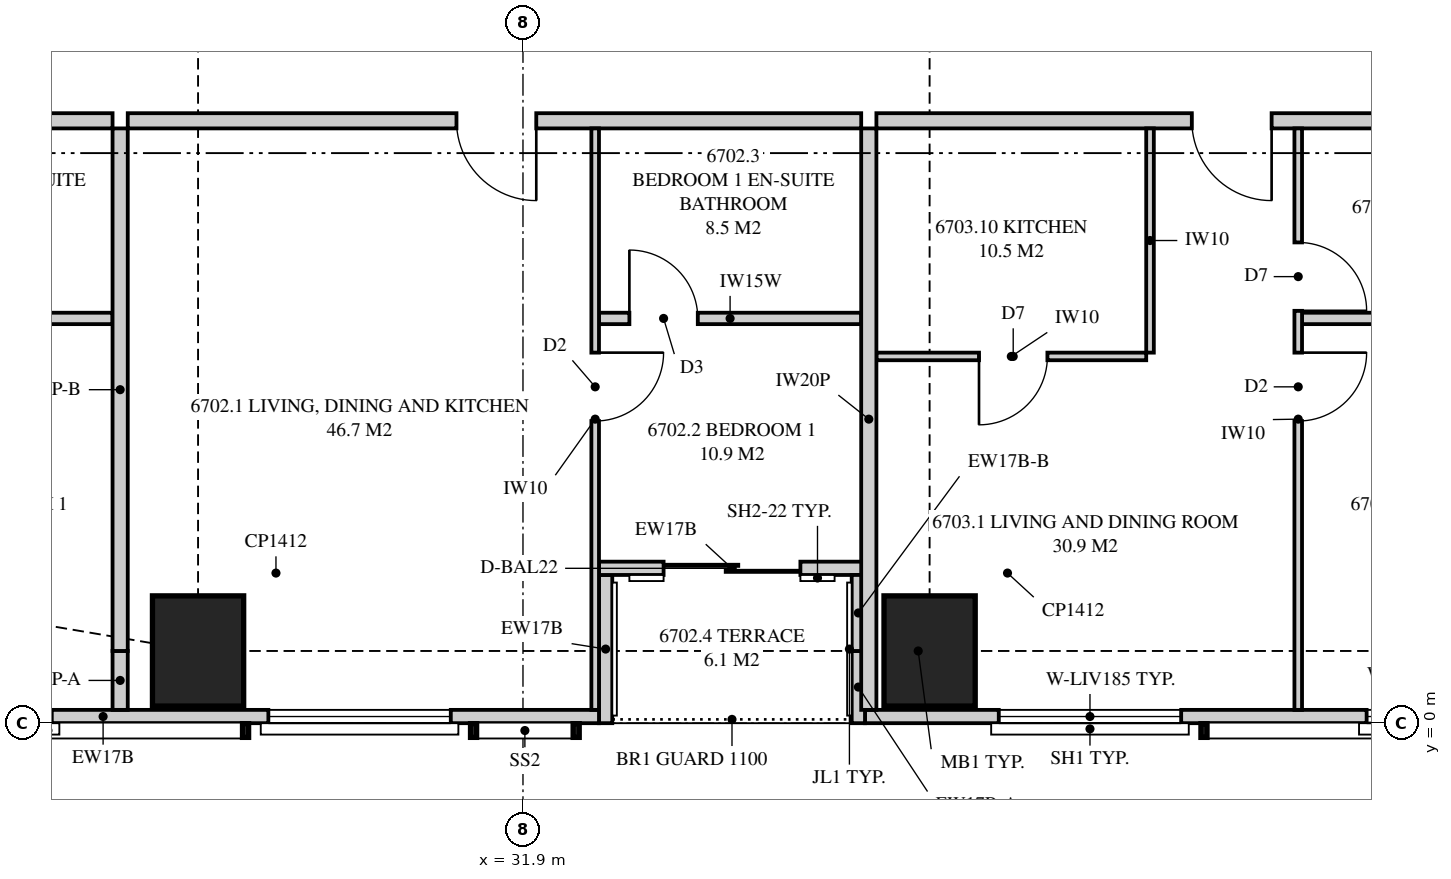
"""IFC4 building model, lengths in metres.
Left out: names, types, materials, properties, quantities, classifications, styles, units other than length and angle.
Written with IfcOpenShell. Run it as: python <this file> out.ifc"""

import sys

from ifc_helpers import new_model, si_unit, direction, frame, frame_2d, origin, origin_2d, place, context, subcontext, project, spatial, polyline, rectangle, outline, extrude, element, fill, save


model = new_model("IFC4")
c1 = context("Model", 3, precision=1e-05, world=origin(), true_north=direction((0.0, 1.0)))
c2 = subcontext(c1, "Body", "Model", "MODEL_VIEW")
j1 = project(units=[si_unit("LENGTHUNIT", "METRE"), si_unit("PLANEANGLEUNIT", "RADIAN")], contexts=[c1])
p1 = place(None, origin())
s1 = spatial("IfcSite", under=j1, at=p1, CompositionType="ELEMENT")
p2 = place(p1, origin())
s2 = spatial("IfcBuilding", under=s1, at=p2, CompositionType="ELEMENT")
p3 = place(p2, frame((0.0, 0.0, 245.95)))
s3 = spatial("IfcBuildingStorey", under=s2, at=p3, CompositionType="ELEMENT", Elevation=245.95)
for number, where, z_axis, x_axis in (
    (1, (27.625, 0.95, 0.0), (0.0, 0.0, 1.0), (0.0, 1.0, 0.0)),
    (2, (37.25, 0.95, 0.0), (0.0, 0.0, 1.0), (0.0, 1.0, 0.0)),
):
    element("IfcColumn", number, at=place(p3, frame(where, z_axis=z_axis, x_axis=x_axis)), inside=s3, PredefinedType="COLUMN", context=c2, shape_type="SweptSolid", body=[
        extrude(rectangle(XDim=1.45, YDim=1.2, at=origin_2d()), origin(), (0.0, 0.0, 1.0), 3.5),
    ])
p4 = place(p3, frame((19.851, 0.087, 0.0), z_axis=(0.0, 0.0, 1.0), x_axis=(1.0, 0.0, 0.0)))
e3 = element("IfcWall", 3, at=p4, inside=s3, PredefinedType="SOLIDWALL", context=c2, shape_type="SweptSolid", body=[
    extrude(outline(polyline([(0.0, 0.0), (13.049, 0.0), (13.049, 2.3), (7.774, 2.3), (7.774, 3.26), (7.642, 3.26), (7.642, 2.3), (7.559, 2.3), (7.559, 3.26), (0.0, 3.26), (0.0, 0.0)])), frame((0.0, 0.087, 0.0), z_axis=(0.0, -1.0, 0.0), x_axis=(1.0, 0.0, 0.0)), (0.0, 0.0, 1.0), 0.175),
])
p5 = place(p4, frame((0.636, 0.0, 0.4)))
e4 = element("IfcOpeningElement", 4, at=p5, cuts=e3, PredefinedType="OPENING", context=c2, shape_type="SweptSolid", body=[
    extrude(rectangle(XDim=1.8, YDim=1.85, at=frame_2d((0.9, 0.925))), frame((0.0, 0.097, 0.0), z_axis=(0.0, -1.0, 0.0), x_axis=(1.0, 0.0, 0.0)), (0.0, 0.0, 1.0), 0.195),
])
p6 = place(p4, frame((4.049, 0.0, 0.4)))
e5 = element("IfcOpeningElement", 5, at=p6, cuts=e3, PredefinedType="OPENING", context=c2, shape_type="SweptSolid", body=[
    extrude(rectangle(XDim=1.8, YDim=1.85, at=frame_2d((0.9, 0.925))), frame((0.0, 0.097, 0.0), z_axis=(0.0, -1.0, 0.0), x_axis=(1.0, 0.0, 0.0)), (0.0, 0.0, 1.0), 0.195),
])
p7 = place(p4, frame((8.699, 0.0, 0.4)))
e6 = element("IfcOpeningElement", 6, at=p7, cuts=e3, PredefinedType="OPENING", context=c2, shape_type="SweptSolid", body=[
    extrude(rectangle(XDim=2.4, YDim=1.85, at=frame_2d((1.2, 0.925))), frame((0.0, 0.097, 0.0), z_axis=(0.0, -1.0, 0.0), x_axis=(1.0, 0.0, 0.0)), (0.0, 0.0, 1.0), 0.195),
])
p8 = place(p3, frame((36.4, 0.087, 0.0), z_axis=(0.0, 0.0, 1.0), x_axis=(1.0, 0.0, 0.0)))
e7 = element("IfcWall", 7, at=p8, inside=s3, PredefinedType="SOLIDWALL", context=c2, shape_type="SweptSolid", body=[
    extrude(outline(polyline([(0.0, 0.0), (17.049, 0.0), (17.049, 3.26), (10.69, 3.26), (10.69, 2.3), (10.606, 2.3), (10.606, 3.26), (10.475, 3.26), (10.475, 2.3), (0.0, 2.3), (0.0, 0.0)])), frame((0.0, 0.087, 0.0), z_axis=(0.0, -1.0, 0.0), x_axis=(1.0, 0.0, 0.0)), (0.0, 0.0, 1.0), 0.175),
])
p9 = place(p8, frame((1.76, 0.0, 0.4)))
e8 = element("IfcOpeningElement", 8, at=p9, cuts=e7, PredefinedType="OPENING", context=c2, shape_type="SweptSolid", body=[
    extrude(rectangle(XDim=2.4, YDim=1.85, at=frame_2d((1.2, 0.925))), frame((0.0, 0.097, 0.0), z_axis=(0.0, -1.0, 0.0), x_axis=(1.0, 0.0, 0.0)), (0.0, 0.0, 1.0), 0.195),
])
p10 = place(p8, frame((6.6, 0.0, 0.4)))
e9 = element("IfcOpeningElement", 9, at=p10, cuts=e7, PredefinedType="OPENING", context=c2, shape_type="SweptSolid", body=[
    extrude(rectangle(XDim=1.8, YDim=1.85, at=frame_2d((0.9, 0.925))), frame((0.0, 0.097, 0.0), z_axis=(0.0, -1.0, 0.0), x_axis=(1.0, 0.0, 0.0)), (0.0, 0.0, 1.0), 0.195),
])
p11 = place(p8, frame((11.357, 0.0, 0.4)))
e10 = element("IfcOpeningElement", 10, at=p11, cuts=e7, PredefinedType="OPENING", context=c2, shape_type="SweptSolid", body=[
    extrude(rectangle(XDim=1.8, YDim=1.85, at=frame_2d((0.9, 0.925))), frame((0.0, 0.097, 0.0), z_axis=(0.0, -1.0, 0.0), x_axis=(1.0, 0.0, 0.0)), (0.0, 0.0, 1.0), 0.195),
])
p12 = place(p8, frame((14.2, 0.0, 0.4)))
e11 = element("IfcOpeningElement", 11, at=p12, cuts=e7, PredefinedType="OPENING", context=c2, shape_type="SweptSolid", body=[
    extrude(rectangle(XDim=1.8, YDim=1.85, at=frame_2d((0.9, 0.925))), frame((0.0, 0.097, 0.0), z_axis=(0.0, -1.0, 0.0), x_axis=(1.0, 0.0, 0.0)), (0.0, 0.0, 1.0), 0.195),
])
p13 = place(p3, frame((32.9, 2.038, 0.0), z_axis=(0.0, 0.0, 1.0), x_axis=(1.0, 0.0, 0.0)))
e12 = element("IfcWall", 12, at=p13, inside=s3, PredefinedType="SOLIDWALL", context=c2, shape_type="SweptSolid", body=[
    extrude(outline(polyline([(0.0, 0.0), (3.5, 0.0), (3.5, 2.66), (3.15, 2.66), (3.15, 3.26), (0.0, 3.26), (0.0, 0.0)])), frame((0.0, 0.087, 0.0), z_axis=(0.0, -1.0, 0.0), x_axis=(1.0, 0.0, 0.0)), (0.0, 0.0, 1.0), 0.175),
])
p14 = place(p13, frame((0.85, 0.0, 0.0)))
e13 = element("IfcOpeningElement", 13, at=p14, cuts=e12, PredefinedType="OPENING", context=c2, shape_type="SweptSolid", body=[
    extrude(rectangle(XDim=1.8, YDim=2.25, at=frame_2d((0.9, 1.125))), frame((0.0, 0.097, 0.0), z_axis=(0.0, -1.0, 0.0), x_axis=(1.0, 0.0, 0.0)), (0.0, 0.0, 1.0), 0.195),
])
p15 = place(p3, frame((32.988, 0.0, 0.0), z_axis=(0.0, 0.0, 1.0), x_axis=(0.0, 1.0, 0.0)))
e14 = element("IfcWall", 14, at=p15, inside=s3, PredefinedType="SOLIDWALL", context=c2, shape_type="SweptSolid", body=[
    extrude(outline(polyline([(0.0, 0.0), (1.95, 0.0), (1.95, 3.26), (1.75, 3.26), (1.75, 2.3), (0.15, 2.3), (0.15, 3.26), (0.0, 3.26), (0.0, 0.0)])), frame((0.0, 0.087, 0.0), z_axis=(0.0, -1.0, 0.0), x_axis=(1.0, 0.0, 0.0)), (0.0, 0.0, 1.0), 0.175),
])
p16 = place(p3, frame((36.312, 0.0, 0.0), z_axis=(0.0, 0.0, 1.0), x_axis=(0.0, 1.0, 0.0)))
e15 = element("IfcWall", 15, at=p16, inside=s3, PredefinedType="SOLIDWALL", context=c2, shape_type="SweptSolid", body=[
    extrude(outline(polyline([(0.0, 0.0), (0.95, 0.0), (0.95, 2.3), (0.15, 2.3), (0.15, 3.26), (0.0, 3.26), (0.0, 0.0)])), frame((0.0, 0.087, 0.0), z_axis=(0.0, -1.0, 0.0), x_axis=(1.0, 0.0, 0.0)), (0.0, 0.0, 1.0), 0.175),
])
p17 = place(p3, frame((36.312, 0.95, 0.0), z_axis=(0.0, 0.0, 1.0), x_axis=(0.0, 1.0, 0.0)))
e16 = element("IfcWall", 16, at=p17, inside=s3, PredefinedType="SOLIDWALL", context=c2, shape_type="SweptSolid", body=[
    extrude(outline(polyline([(0.0, 0.0), (1.0, 0.0), (1.0, 2.66), (0.8, 2.66), (0.8, 2.3), (0.0, 2.3), (0.0, 0.0)])), frame((0.0, 0.087, 0.0), z_axis=(0.0, -1.0, 0.0), x_axis=(1.0, 0.0, 0.0)), (0.0, 0.0, 1.0), 0.175),
])
p18 = place(p3, frame((26.6, 0.175, 0.0), z_axis=(0.0, 0.0, 1.0), x_axis=(0.0, 1.0, 0.0)))
e17 = element("IfcWall", 17, at=p18, inside=s3, PredefinedType="PARTITIONING", context=c2, shape_type="SweptSolid", body=[
    extrude(outline(polyline([(0.0, 0.0), (0.775, 0.0), (0.775, 2.3), (0.026, 2.3), (0.026, 3.26), (0.0, 3.26), (0.0, 0.0)])), frame((0.0, 0.1, 0.0), z_axis=(0.0, -1.0, 0.0), x_axis=(1.0, 0.0, 0.0)), (0.0, 0.0, 1.0), 0.2),
])
p19 = place(p3, frame((26.6, 0.95, 0.0), z_axis=(0.0, 0.0, 1.0), x_axis=(0.0, 1.0, 0.0)))
e18 = element("IfcWall", 18, at=p19, inside=s3, PredefinedType="PARTITIONING", context=c2, shape_type="SweptSolid", body=[
    extrude(outline(polyline([(0.0, 0.0), (6.875, 0.0), (6.875, 2.66), (1.097, 2.66), (1.097, 2.3), (0.0, 2.3), (0.0, 0.0)])), frame((0.0, 0.1, 0.0), z_axis=(0.0, -1.0, 0.0), x_axis=(1.0, 0.0, 0.0)), (0.0, 0.0, 1.0), 0.2),
])
p20 = place(p3, frame((18.0, 7.925, 0.0), z_axis=(0.0, 0.0, 1.0), x_axis=(1.0, 0.0, 0.0)))
e19 = element("IfcWall", 19, at=p20, inside=s3, PredefinedType="PARTITIONING", context=c2, shape_type="SweptSolid", body=[
    extrude(outline(polyline([(0.0, 0.0), (8.5, 0.0), (8.5, 3.26), (8.5, 2.66), (8.315, 2.66), (8.315, 3.26), (1.839, 3.26), (1.839, 2.3), (0.0, 2.3), (0.0, 3.26), (0.0, 0.0)])), frame((0.0, 0.1, 0.0), z_axis=(0.0, -1.0, 0.0), x_axis=(1.0, 0.0, 0.0)), (0.0, 0.0, 1.0), 0.2),
])
p21 = place(p20, frame((3.6, 0.0, 0.0)))
e20 = element("IfcOpeningElement", 20, at=p21, cuts=e19, PredefinedType="OPENING", context=c2, shape_type="SweptSolid", body=[
    extrude(rectangle(XDim=1.05, YDim=2.2, at=frame_2d((0.525, 1.1))), frame((0.0, 0.11, 0.0), z_axis=(0.0, -1.0, 0.0), x_axis=(1.0, 0.0, 0.0)), (0.0, 0.0, 1.0), 0.22),
])
p22 = place(p3, frame((23.05, 5.325, 0.0), z_axis=(0.0, 0.0, 1.0), x_axis=(1.0, 0.0, 0.0)))
e21 = element("IfcWall", 21, at=p22, inside=s3, PredefinedType="PLUMBINGWALL", context=c2, shape_type="SweptSolid", body=[
    extrude(outline(polyline([(0.0, 0.0), (3.45, 0.0), (3.45, 3.26), (3.45, 2.66), (3.29, 2.66), (3.29, 3.26), (0.0, 3.26), (0.0, 0.0)])), frame((0.0, 0.075, 0.0), z_axis=(0.0, -1.0, 0.0), x_axis=(1.0, 0.0, 0.0)), (0.0, 0.0, 1.0), 0.15),
])
p23 = place(p22, frame((0.4, 0.0, 0.0)))
e22 = element("IfcOpeningElement", 22, at=p23, cuts=e21, PredefinedType="OPENING", context=c2, shape_type="SweptSolid", body=[
    extrude(rectangle(XDim=0.9, YDim=2.1, at=frame_2d((0.45, 1.05))), frame((0.0, 0.085, 0.0), z_axis=(0.0, -1.0, 0.0), x_axis=(1.0, 0.0, 0.0)), (0.0, 0.0, 1.0), 0.17),
])
p24 = place(p3, frame((36.45, 0.175, 0.0), z_axis=(0.0, 0.0, 1.0), x_axis=(0.0, 1.0, 0.0)))
e23 = element("IfcWall", 23, at=p24, inside=s3, PredefinedType="PARTITIONING", context=c2, shape_type="SweptSolid", body=[
    extrude(outline(polyline([(0.0, 0.0), (7.65, 0.0), (7.65, 3.26), (7.65, 2.66), (1.685, 2.66), (1.685, 2.3), (0.0, 2.3), (0.0, 3.26), (0.0, 0.0)])), frame((0.0, 0.1, 0.0), z_axis=(0.0, -1.0, 0.0), x_axis=(1.0, 0.0, 0.0)), (0.0, 0.0, 1.0), 0.2),
])
p25 = place(p3, frame((26.7, 7.925, 0.0), z_axis=(0.0, 0.0, 1.0), x_axis=(1.0, 0.0, 0.0)))
e24 = element("IfcWall", 24, at=p25, inside=s3, PredefinedType="PARTITIONING", context=c2, shape_type="SweptSolid", body=[
    extrude(outline(polyline([(0.0, 0.0), (9.65, 0.0), (9.65, 3.26), (9.65, 2.66), (9.24, 2.66), (9.24, 3.26), (2.235, 3.26), (2.235, 2.66), (0.0, 2.66), (0.0, 3.26), (0.0, 0.0)])), frame((0.0, 0.1, 0.0), z_axis=(0.0, -1.0, 0.0), x_axis=(1.0, 0.0, 0.0)), (0.0, 0.0, 1.0), 0.2),
])
p26 = place(p25, frame((4.325, 0.0, 0.0)))
e25 = element("IfcOpeningElement", 25, at=p26, cuts=e24, PredefinedType="OPENING", context=c2, shape_type="SweptSolid", body=[
    extrude(rectangle(XDim=1.05, YDim=2.2, at=frame_2d((0.525, 1.1))), frame((0.0, 0.11, 0.0), z_axis=(0.0, -1.0, 0.0), x_axis=(1.0, 0.0, 0.0)), (0.0, 0.0, 1.0), 0.22),
])
p27 = place(p3, frame((32.85, 0.175, 0.0), z_axis=(0.0, 0.0, 1.0), x_axis=(0.0, 1.0, 0.0)))
e26 = element("IfcWall", 26, at=p27, inside=s3, PredefinedType="PARTITIONING", context=c2, shape_type="SweptSolid", body=[
    extrude(outline(polyline([(0.0, 0.0), (7.65, 0.0), (7.65, 3.26), (1.635, 3.26), (1.635, 2.3), (0.0, 2.3), (0.0, 3.26), (0.0, 0.0)])), frame((0.0, 0.05, 0.0), z_axis=(0.0, -1.0, 0.0), x_axis=(1.0, 0.0, 0.0)), (0.0, 0.0, 1.0), 0.1),
])
p28 = place(p27, frame((3.8, 0.0, 0.0)))
e27 = element("IfcOpeningElement", 27, at=p28, cuts=e26, PredefinedType="OPENING", context=c2, shape_type="SweptSolid", body=[
    extrude(rectangle(XDim=0.9, YDim=2.1, at=frame_2d((0.45, 1.05))), frame((0.0, 0.06, 0.0), z_axis=(0.0, -1.0, 0.0), x_axis=(1.0, 0.0, 0.0)), (0.0, 0.0, 1.0), 0.12),
])
p29 = place(p3, frame((32.9, 5.325, 0.0), z_axis=(0.0, 0.0, 1.0), x_axis=(1.0, 0.0, 0.0)))
e28 = element("IfcWall", 28, at=p29, inside=s3, PredefinedType="PLUMBINGWALL", context=c2, shape_type="SweptSolid", body=[
    extrude(outline(polyline([(0.0, 0.0), (3.45, 0.0), (3.45, 3.26), (3.45, 2.66), (3.065, 2.66), (3.065, 3.26), (0.0, 3.26), (0.0, 0.0)])), frame((0.0, 0.075, 0.0), z_axis=(0.0, -1.0, 0.0), x_axis=(1.0, 0.0, 0.0)), (0.0, 0.0, 1.0), 0.15),
])
p30 = place(p29, frame((0.4, 0.0, 0.0)))
e29 = element("IfcOpeningElement", 29, at=p30, cuts=e28, PredefinedType="OPENING", context=c2, shape_type="SweptSolid", body=[
    extrude(rectangle(XDim=0.9, YDim=2.1, at=frame_2d((0.45, 1.05))), frame((0.0, 0.085, 0.0), z_axis=(0.0, -1.0, 0.0), x_axis=(1.0, 0.0, 0.0)), (0.0, 0.0, 1.0), 0.17),
])
p31 = place(p3, frame((36.55, 7.925, 0.0), z_axis=(0.0, 0.0, 1.0), x_axis=(1.0, 0.0, 0.0)))
e30 = element("IfcWall", 30, at=p31, inside=s3, PredefinedType="PARTITIONING", context=c2, shape_type="SweptSolid", body=[
    extrude(outline(polyline([(0.0, 0.0), (9.325, 0.0), (9.325, 3.26), (9.325, 2.66), (9.015, 2.66), (9.015, 3.26), (2.01, 3.26), (2.01, 2.66), (0.0, 2.66), (0.0, 3.26), (0.0, 0.0)])), frame((0.0, 0.1, 0.0), z_axis=(0.0, -1.0, 0.0), x_axis=(1.0, 0.0, 0.0)), (0.0, 0.0, 1.0), 0.2),
])
p32 = place(p31, frame((4.15, 0.0, 0.0)))
e31 = element("IfcOpeningElement", 31, at=p32, cuts=e30, PredefinedType="OPENING", context=c2, shape_type="SweptSolid", body=[
    extrude(rectangle(XDim=1.05, YDim=2.2, at=frame_2d((0.525, 1.1))), frame((0.0, 0.11, 0.0), z_axis=(0.0, -1.0, 0.0), x_axis=(1.0, 0.0, 0.0)), (0.0, 0.0, 1.0), 0.22),
])
p33 = place(p3, frame((42.1, 0.175, 0.0), z_axis=(0.0, 0.0, 1.0), x_axis=(0.0, 1.0, 0.0)))
e32 = element("IfcWall", 32, at=p33, inside=s3, PredefinedType="PARTITIONING", context=c2, shape_type="SweptSolid", body=[
    extrude(outline(polyline([(0.0, 0.0), (7.65, 0.0), (7.65, 3.26), (1.635, 3.26), (1.635, 2.3), (0.0, 2.3), (0.0, 3.26), (0.0, 0.0)])), frame((0.0, 0.05, 0.0), z_axis=(0.0, -1.0, 0.0), x_axis=(1.0, 0.0, 0.0)), (0.0, 0.0, 1.0), 0.1),
])
p34 = place(p33, frame((3.8, 0.0, 0.0)))
e33 = element("IfcOpeningElement", 33, at=p34, cuts=e32, PredefinedType="OPENING", context=c2, shape_type="SweptSolid", body=[
    extrude(rectangle(XDim=0.9, YDim=2.1, at=frame_2d((0.45, 1.05))), frame((0.0, 0.06, 0.0), z_axis=(0.0, -1.0, 0.0), x_axis=(1.0, 0.0, 0.0)), (0.0, 0.0, 1.0), 0.12),
])
p35 = place(p33, frame((5.25, 0.0, 0.0)))
e34 = element("IfcOpeningElement", 34, at=p35, cuts=e32, PredefinedType="OPENING", context=c2, shape_type="SweptSolid", body=[
    extrude(rectangle(XDim=0.9, YDim=2.1, at=frame_2d((0.45, 1.05))), frame((0.0, 0.06, 0.0), z_axis=(0.0, -1.0, 0.0), x_axis=(1.0, 0.0, 0.0)), (0.0, 0.0, 1.0), 0.12),
])
p36 = place(p3, frame((42.15, 5.325, 0.0), z_axis=(0.0, 0.0, 1.0), x_axis=(1.0, 0.0, 0.0)))
e35 = element("IfcWall", 35, at=p36, inside=s3, PredefinedType="PLUMBINGWALL", context=c2, shape_type="SweptSolid", body=[
    extrude(outline(polyline([(0.0, 0.0), (3.5, 0.0), (3.5, 3.26), (3.5, 2.66), (3.44, 2.66), (3.44, 3.26), (0.0, 3.26), (0.0, 0.0)])), frame((0.0, 0.075, 0.0), z_axis=(0.0, -1.0, 0.0), x_axis=(1.0, 0.0, 0.0)), (0.0, 0.0, 1.0), 0.15),
])
p37 = place(p3, frame((36.55, 4.825, 0.0), z_axis=(0.0, 0.0, 1.0), x_axis=(1.0, 0.0, 0.0)))
e36 = element("IfcWall", 36, at=p37, inside=s3, PredefinedType="PARTITIONING", context=c2, shape_type="SweptSolid", body=[
    extrude(outline(polyline([(0.0, 0.0), (3.55, 0.0), (3.55, 3.26), (1.96, 3.26), (1.96, 2.66), (0.0, 2.66), (0.0, 3.26), (0.0, 0.0)])), frame((0.0, 0.05, 0.0), z_axis=(0.0, -1.0, 0.0), x_axis=(1.0, 0.0, 0.0)), (0.0, 0.0, 1.0), 0.1),
])
p38 = place(p37, frame((1.35, 0.0, 0.0)))
e37 = element("IfcOpeningElement", 37, at=p38, cuts=e36, PredefinedType="OPENING", context=c2, shape_type="SweptSolid", body=[
    extrude(rectangle(XDim=0.9, YDim=2.1, at=frame_2d((0.45, 1.05))), frame((0.0, 0.06, 0.0), z_axis=(0.0, -1.0, 0.0), x_axis=(1.0, 0.0, 0.0)), (0.0, 0.0, 1.0), 0.12),
])
p39 = place(p3, frame((40.15, 4.875, 0.0), z_axis=(0.0, 0.0, 1.0), x_axis=(0.0, 1.0, 0.0)))
e38 = element("IfcWall", 38, at=p39, inside=s3, PredefinedType="PARTITIONING", context=c2, shape_type="SweptSolid", body=[
    extrude(rectangle(XDim=2.95, YDim=0.1, at=frame_2d((1.475, 0.0))), origin(), (0.0, 0.0, 1.0), 3.26),
])
p40 = place(p7, origin())
e39 = element("IfcWindow", 39, at=p40, inside=s3, PartitioningType="SINGLE_PANEL", PredefinedType="WINDOW", context=c2, shape_type="SweptSolid", body=[
    extrude(rectangle(XDim=2.4, YDim=1.85, at=frame_2d((1.2, 0.925))), frame((0.0, 0.03, 0.0), z_axis=(0.0, -1.0, 0.0), x_axis=(1.0, 0.0, 0.0)), (0.0, 0.0, 1.0), 0.06),
])
fill(e6, e39)
p41 = place(p14, origin())
e40 = element("IfcDoor", 40, at=p41, inside=s3, OperationType="SLIDING_TO_LEFT", PredefinedType="DOOR", context=c2, shape_type="SweptSolid", body=[
    extrude(rectangle(XDim=1.8, YDim=2.25, at=frame_2d((0.9, 1.125))), frame((0.0, 0.025, 0.0), z_axis=(0.0, -1.0, 0.0), x_axis=(1.0, 0.0, 0.0)), (0.0, 0.0, 1.0), 0.05),
])
fill(e13, e40)
p42 = place(p9, origin())
e41 = element("IfcWindow", 41, at=p42, inside=s3, PartitioningType="SINGLE_PANEL", PredefinedType="WINDOW", context=c2, shape_type="SweptSolid", body=[
    extrude(rectangle(XDim=2.4, YDim=1.85, at=frame_2d((1.2, 0.925))), frame((0.0, 0.03, 0.0), z_axis=(0.0, -1.0, 0.0), x_axis=(1.0, 0.0, 0.0)), (0.0, 0.0, 1.0), 0.06),
])
fill(e8, e41)
p43 = place(p10, origin())
e42 = element("IfcWindow", 42, at=p43, inside=s3, PartitioningType="SINGLE_PANEL", PredefinedType="WINDOW", context=c2, shape_type="SweptSolid", body=[
    extrude(rectangle(XDim=1.8, YDim=1.85, at=frame_2d((0.9, 0.925))), frame((0.0, 0.03, 0.0), z_axis=(0.0, -1.0, 0.0), x_axis=(1.0, 0.0, 0.0)), (0.0, 0.0, 1.0), 0.06),
])
fill(e9, e42)
p44 = place(p26, frame((1.05, 0.0, 0.0), z_axis=(0.0, 0.0, 1.0), x_axis=(-1.0, 0.0, 0.0)))
e43 = element("IfcDoor", 43, at=p44, inside=s3, OperationType="SINGLE_SWING_LEFT", PredefinedType="DOOR", context=c2, shape_type="SweptSolid", body=[
    extrude(rectangle(XDim=1.05, YDim=2.2, at=frame_2d((0.525, 1.1))), frame((0.0, 0.025, 0.0), z_axis=(0.0, -1.0, 0.0), x_axis=(1.0, 0.0, 0.0)), (0.0, 0.0, 1.0), 0.05),
])
fill(e25, e43)
p45 = place(p28, frame((0.9, 0.0, 0.0), z_axis=(0.0, 0.0, 1.0), x_axis=(-1.0, 0.0, 0.0)))
e44 = element("IfcDoor", 44, at=p45, inside=s3, OperationType="SINGLE_SWING_LEFT", PredefinedType="DOOR", context=c2, shape_type="SweptSolid", body=[
    extrude(rectangle(XDim=0.9, YDim=2.1, at=frame_2d((0.45, 1.05))), frame((0.0, 0.025, 0.0), z_axis=(0.0, -1.0, 0.0), x_axis=(1.0, 0.0, 0.0)), (0.0, 0.0, 1.0), 0.05),
])
fill(e27, e44)
p46 = place(p30, origin())
e45 = element("IfcDoor", 45, at=p46, inside=s3, OperationType="SINGLE_SWING_LEFT", PredefinedType="DOOR", context=c2, shape_type="SweptSolid", body=[
    extrude(rectangle(XDim=0.9, YDim=2.1, at=frame_2d((0.45, 1.05))), frame((0.0, 0.025, 0.0), z_axis=(0.0, -1.0, 0.0), x_axis=(1.0, 0.0, 0.0)), (0.0, 0.0, 1.0), 0.05),
])
fill(e29, e45)
p47 = place(p32, frame((1.05, 0.0, 0.0), z_axis=(0.0, 0.0, 1.0), x_axis=(-1.0, 0.0, 0.0)))
e46 = element("IfcDoor", 46, at=p47, inside=s3, OperationType="SINGLE_SWING_LEFT", PredefinedType="DOOR", context=c2, shape_type="SweptSolid", body=[
    extrude(rectangle(XDim=1.05, YDim=2.2, at=frame_2d((0.525, 1.1))), frame((0.0, 0.025, 0.0), z_axis=(0.0, -1.0, 0.0), x_axis=(1.0, 0.0, 0.0)), (0.0, 0.0, 1.0), 0.05),
])
fill(e31, e46)
p48 = place(p34, frame((0.9, 0.0, 0.0), z_axis=(0.0, 0.0, 1.0), x_axis=(-1.0, 0.0, 0.0)))
e47 = element("IfcDoor", 47, at=p48, inside=s3, OperationType="SINGLE_SWING_LEFT", PredefinedType="DOOR", context=c2, shape_type="SweptSolid", body=[
    extrude(rectangle(XDim=0.9, YDim=2.1, at=frame_2d((0.45, 1.05))), frame((0.0, 0.025, 0.0), z_axis=(0.0, -1.0, 0.0), x_axis=(1.0, 0.0, 0.0)), (0.0, 0.0, 1.0), 0.05),
])
fill(e33, e47)
p49 = place(p35, frame((0.9, 0.0, 0.0), z_axis=(0.0, 0.0, 1.0), x_axis=(-1.0, 0.0, 0.0)))
e48 = element("IfcDoor", 48, at=p49, inside=s3, OperationType="SINGLE_SWING_RIGHT", PredefinedType="DOOR", context=c2, shape_type="SweptSolid", body=[
    extrude(rectangle(XDim=0.9, YDim=2.1, at=frame_2d((0.45, 1.05))), frame((0.0, 0.025, 0.0), z_axis=(0.0, -1.0, 0.0), x_axis=(1.0, 0.0, 0.0)), (0.0, 0.0, 1.0), 0.05),
])
fill(e34, e48)
p50 = place(p38, frame((0.9, 0.0, 0.0), z_axis=(0.0, 0.0, 1.0), x_axis=(-1.0, 0.0, 0.0)))
e49 = element("IfcDoor", 49, at=p50, inside=s3, OperationType="SINGLE_SWING_RIGHT", PredefinedType="DOOR", context=c2, shape_type="SweptSolid", body=[
    extrude(rectangle(XDim=0.9, YDim=2.1, at=frame_2d((0.45, 1.05))), frame((0.0, 0.025, 0.0), z_axis=(0.0, -1.0, 0.0), x_axis=(1.0, 0.0, 0.0)), (0.0, 0.0, 1.0), 0.05),
])
fill(e37, e49)
save(model, sys.argv[1])
